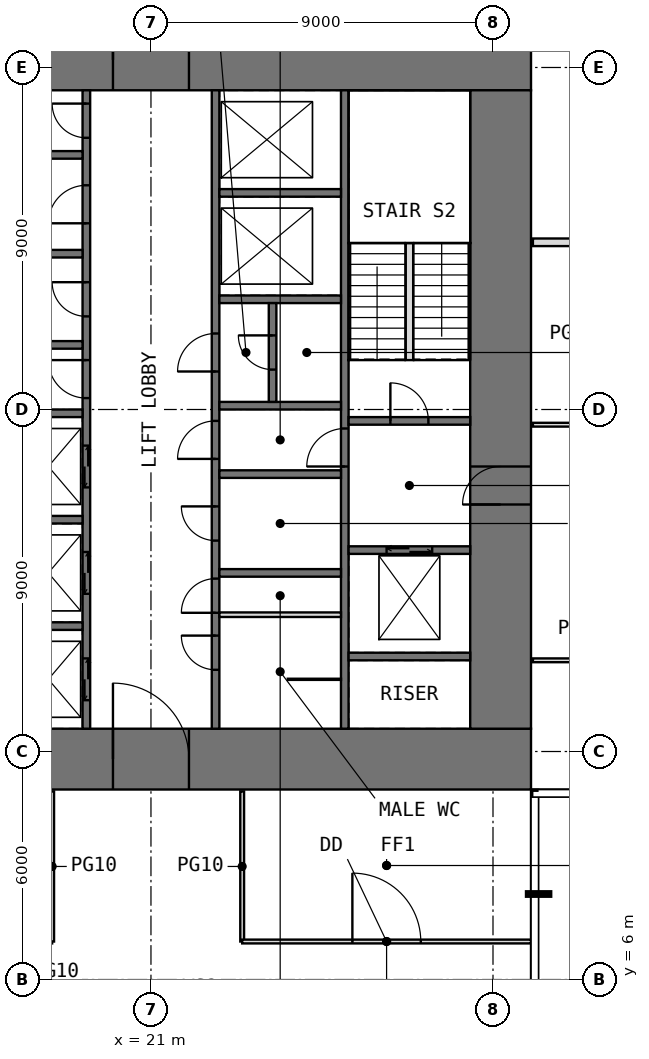
"""IFC4 building model, lengths in metres.
Left out: names, types, materials, properties, quantities, classifications, styles, units other than length and angle.
Written with IfcOpenShell. Run it as: python <this file> out.ifc"""

import sys

from ifc_helpers import new_model, si_unit, direction, frame, frame_2d, origin, place, context, subcontext, project, spatial, rectangle, extrude, element, fill, save


model = new_model("IFC4")
c1 = context("Model", 3, precision=1e-05, world=origin(), true_north=direction((0.0, 1.0)))
c2 = subcontext(c1, "Body", "Model", "MODEL_VIEW")
j1 = project(units=[si_unit("LENGTHUNIT", "METRE"), si_unit("PLANEANGLEUNIT", "RADIAN")], contexts=[c1])
p1 = place(None, origin())
s1 = spatial("IfcSite", under=j1, at=p1, CompositionType="ELEMENT")
p2 = place(p1, origin())
s2 = spatial("IfcBuilding", under=s1, at=p2, CompositionType="ELEMENT")
p3 = place(p2, frame((0.0, 0.0, 108.5)))
s3 = spatial("IfcBuildingStorey", under=s2, at=p3, CompositionType="ELEMENT", Elevation=108.5)
p4 = place(p3, frame((11.0, 11.8, -0.05), z_axis=(0.0, 0.0, 1.0), x_axis=(1.0, 0.0, 0.0)))
e1 = element("IfcWall", 1, at=p4, inside=s3, PredefinedType="SHEAR", context=c2, shape_type="SweptSolid", body=[
    extrude(rectangle(XDim=20.0, YDim=1.6, at=frame_2d((10.0, 0.0))), origin(), (0.0, 0.0, 1.0), 4.0),
])
p5 = place(p4, frame((9.0, 0.0, 0.05)))
e2 = element("IfcOpeningElement", 2, at=p5, cuts=e1, PredefinedType="OPENING", context=c2, shape_type="SweptSolid", body=[
    extrude(rectangle(XDim=2.0, YDim=2.2, at=frame_2d((1.0, 1.1))), frame((0.0, 0.81, 0.0), z_axis=(0.0, -1.0, 0.0), x_axis=(1.0, 0.0, 0.0)), (0.0, 0.0, 1.0), 1.62),
])
p6 = place(p3, frame((11.0, 30.2, -0.05), z_axis=(0.0, 0.0, 1.0), x_axis=(1.0, 0.0, 0.0)))
e3 = element("IfcWall", 3, at=p6, inside=s3, PredefinedType="SHEAR", context=c2, shape_type="SweptSolid", body=[
    extrude(rectangle(XDim=20.0, YDim=1.6, at=frame_2d((10.0, 0.0))), origin(), (0.0, 0.0, 1.0), 4.0),
])
p7 = place(p6, frame((9.0, 0.0, 0.05)))
e4 = element("IfcOpeningElement", 4, at=p7, cuts=e3, PredefinedType="OPENING", context=c2, shape_type="SweptSolid", body=[
    extrude(rectangle(XDim=2.0, YDim=2.2, at=frame_2d((1.0, 1.1))), frame((0.0, 0.81, 0.0), z_axis=(0.0, -1.0, 0.0), x_axis=(1.0, 0.0, 0.0)), (0.0, 0.0, 1.0), 1.62),
])
p8 = place(p3, frame((30.2, 12.6, -0.05), z_axis=(0.0, 0.0, 1.0), x_axis=(0.0, 1.0, 0.0)))
e5 = element("IfcWall", 5, at=p8, inside=s3, PredefinedType="SHEAR", context=c2, shape_type="SweptSolid", body=[
    extrude(rectangle(XDim=16.8, YDim=1.6, at=frame_2d((8.4, 0.0))), origin(), (0.0, 0.0, 1.0), 4.0),
])
p9 = place(p8, frame((5.9, 0.0, 0.05)))
e6 = element("IfcOpeningElement", 6, at=p9, cuts=e5, PredefinedType="OPENING", context=c2, shape_type="SweptSolid", body=[
    extrude(rectangle(XDim=1.0, YDim=2.2, at=frame_2d((0.5, 1.1))), frame((0.0, 0.81, 0.0), z_axis=(0.0, -1.0, 0.0), x_axis=(1.0, 0.0, 0.0)), (0.0, 0.0, 1.0), 1.62),
])
p10 = place(p3, frame((19.3, 12.6, -0.05), z_axis=(0.0, 0.0, 1.0), x_axis=(0.0, 1.0, 0.0)))
e7 = element("IfcWall", 7, at=p10, inside=s3, PredefinedType="SHEAR", context=c2, shape_type="SweptSolid", body=[
    extrude(rectangle(XDim=16.8, YDim=0.2, at=frame_2d((8.4, 0.0))), origin(), (0.0, 0.0, 1.0), 4.0),
])
p11 = place(p10, frame((8.7, 0.0, 0.05)))
e8 = element("IfcOpeningElement", 8, at=p11, cuts=e7, PredefinedType="OPENING", context=c2, shape_type="SweptSolid", body=[
    extrude(rectangle(XDim=1.0, YDim=2.2, at=frame_2d((0.5, 1.1))), frame((0.0, 0.11, 0.0), z_axis=(0.0, -1.0, 0.0), x_axis=(1.0, 0.0, 0.0)), (0.0, 0.0, 1.0), 0.22),
])
p12 = place(p10, frame((10.85, 0.0, 0.05)))
e9 = element("IfcOpeningElement", 9, at=p12, cuts=e7, PredefinedType="OPENING", context=c2, shape_type="SweptSolid", body=[
    extrude(rectangle(XDim=0.9, YDim=2.2, at=frame_2d((0.45, 1.1))), frame((0.0, 0.11, 0.0), z_axis=(0.0, -1.0, 0.0), x_axis=(1.0, 0.0, 0.0)), (0.0, 0.0, 1.0), 0.22),
])
p13 = place(p10, frame((13.3, 0.0, 0.05)))
e10 = element("IfcOpeningElement", 10, at=p13, cuts=e7, PredefinedType="OPENING", context=c2, shape_type="SweptSolid", body=[
    extrude(rectangle(XDim=1.0, YDim=2.2, at=frame_2d((0.5, 1.1))), frame((0.0, 0.11, 0.0), z_axis=(0.0, -1.0, 0.0), x_axis=(1.0, 0.0, 0.0)), (0.0, 0.0, 1.0), 0.22),
])
p14 = place(p10, frame((15.55, 0.0, 0.05)))
e11 = element("IfcOpeningElement", 11, at=p14, cuts=e7, PredefinedType="OPENING", context=c2, shape_type="SweptSolid", body=[
    extrude(rectangle(XDim=0.9, YDim=2.2, at=frame_2d((0.45, 1.1))), frame((0.0, 0.11, 0.0), z_axis=(0.0, -1.0, 0.0), x_axis=(1.0, 0.0, 0.0)), (0.0, 0.0, 1.0), 0.22),
])
p15 = place(p10, frame((0.75, 0.0, 0.05)))
e12 = element("IfcOpeningElement", 12, at=p15, cuts=e7, PredefinedType="OPENING", context=c2, shape_type="SweptSolid", body=[
    extrude(rectangle(XDim=1.1, YDim=2.2, at=frame_2d((0.55, 1.1))), frame((0.0, 0.11, 0.0), z_axis=(0.0, -1.0, 0.0), x_axis=(1.0, 0.0, 0.0)), (0.0, 0.0, 1.0), 0.22),
])
p16 = place(p10, frame((3.55, 0.0, 0.05)))
e13 = element("IfcOpeningElement", 13, at=p16, cuts=e7, PredefinedType="OPENING", context=c2, shape_type="SweptSolid", body=[
    extrude(rectangle(XDim=1.1, YDim=2.2, at=frame_2d((0.55, 1.1))), frame((0.0, 0.11, 0.0), z_axis=(0.0, -1.0, 0.0), x_axis=(1.0, 0.0, 0.0)), (0.0, 0.0, 1.0), 0.22),
])
p17 = place(p10, frame((6.35, 0.0, 0.05)))
e14 = element("IfcOpeningElement", 14, at=p17, cuts=e7, PredefinedType="OPENING", context=c2, shape_type="SweptSolid", body=[
    extrude(rectangle(XDim=1.1, YDim=2.2, at=frame_2d((0.55, 1.1))), frame((0.0, 0.11, 0.0), z_axis=(0.0, -1.0, 0.0), x_axis=(1.0, 0.0, 0.0)), (0.0, 0.0, 1.0), 0.22),
])
p18 = place(p3, frame((22.7, 12.6, -0.05), z_axis=(0.0, 0.0, 1.0), x_axis=(0.0, 1.0, 0.0)))
e15 = element("IfcWall", 15, at=p18, inside=s3, PredefinedType="SHEAR", context=c2, shape_type="SweptSolid", body=[
    extrude(rectangle(XDim=16.8, YDim=0.2, at=frame_2d((8.4, 0.0))), origin(), (0.0, 0.0, 1.0), 4.0),
])
p19 = place(p18, frame((3.05, 0.0, 0.05)))
e16 = element("IfcOpeningElement", 16, at=p19, cuts=e15, PredefinedType="OPENING", context=c2, shape_type="SweptSolid", body=[
    extrude(rectangle(XDim=0.9, YDim=2.2, at=frame_2d((0.45, 1.1))), frame((0.0, 0.11, 0.0), z_axis=(0.0, -1.0, 0.0), x_axis=(1.0, 0.0, 0.0)), (0.0, 0.0, 1.0), 0.22),
])
p20 = place(p18, frame((7.1, 0.0, 0.05)))
e17 = element("IfcOpeningElement", 17, at=p20, cuts=e15, PredefinedType="OPENING", context=c2, shape_type="SweptSolid", body=[
    extrude(rectangle(XDim=1.0, YDim=2.2, at=frame_2d((0.5, 1.1))), frame((0.0, 0.11, 0.0), z_axis=(0.0, -1.0, 0.0), x_axis=(1.0, 0.0, 0.0)), (0.0, 0.0, 1.0), 0.22),
])
p21 = place(p18, frame((1.55, 0.0, 0.05)))
e18 = element("IfcOpeningElement", 18, at=p21, cuts=e15, PredefinedType="OPENING", context=c2, shape_type="SweptSolid", body=[
    extrude(rectangle(XDim=0.9, YDim=2.2, at=frame_2d((0.45, 1.1))), frame((0.0, 0.11, 0.0), z_axis=(0.0, -1.0, 0.0), x_axis=(1.0, 0.0, 0.0)), (0.0, 0.0, 1.0), 0.22),
])
p22 = place(p18, frame((4.95, 0.0, 0.05)))
e19 = element("IfcOpeningElement", 19, at=p22, cuts=e15, PredefinedType="OPENING", context=c2, shape_type="SweptSolid", body=[
    extrude(rectangle(XDim=0.9, YDim=2.2, at=frame_2d((0.45, 1.1))), frame((0.0, 0.11, 0.0), z_axis=(0.0, -1.0, 0.0), x_axis=(1.0, 0.0, 0.0)), (0.0, 0.0, 1.0), 0.22),
])
p23 = place(p18, frame((9.4, 0.0, 0.05)))
e20 = element("IfcOpeningElement", 20, at=p23, cuts=e15, PredefinedType="OPENING", context=c2, shape_type="SweptSolid", body=[
    extrude(rectangle(XDim=1.0, YDim=2.2, at=frame_2d((0.5, 1.1))), frame((0.0, 0.11, 0.0), z_axis=(0.0, -1.0, 0.0), x_axis=(1.0, 0.0, 0.0)), (0.0, 0.0, 1.0), 0.22),
])
p24 = place(p3, frame((26.1, 12.6, -0.05), z_axis=(0.0, 0.0, 1.0), x_axis=(0.0, 1.0, 0.0)))
e21 = element("IfcWall", 21, at=p24, inside=s3, PredefinedType="SHEAR", context=c2, shape_type="SweptSolid", body=[
    extrude(rectangle(XDim=16.8, YDim=0.2, at=frame_2d((8.4, 0.0))), origin(), (0.0, 0.0, 1.0), 4.0),
])
p25 = place(p24, frame((6.9, 0.0, 0.05)))
e22 = element("IfcOpeningElement", 22, at=p25, cuts=e21, PredefinedType="OPENING", context=c2, shape_type="SweptSolid", body=[
    extrude(rectangle(XDim=1.0, YDim=2.2, at=frame_2d((0.5, 1.1))), frame((0.0, 0.11, 0.0), z_axis=(0.0, -1.0, 0.0), x_axis=(1.0, 0.0, 0.0)), (0.0, 0.0, 1.0), 0.22),
])
for number, where, z_axis, x_axis in (
    (23, (16.0, 15.3, -0.05), (0.0, 0.0, 1.0), (1.0, 0.0, 0.0)),
    (24, (16.0, 18.1, -0.05), (0.0, 0.0, 1.0), (1.0, 0.0, 0.0)),
    (25, (16.0, 20.9, -0.05), (0.0, 0.0, 1.0), (1.0, 0.0, 0.0)),
    (26, (16.0, 22.7, -0.05), (0.0, 0.0, 1.0), (1.0, 0.0, 0.0)),
    (27, (16.0, 25.1, -0.05), (0.0, 0.0, 1.0), (1.0, 0.0, 0.0)),
    (28, (16.0, 27.7, -0.05), (0.0, 0.0, 1.0), (1.0, 0.0, 0.0)),
    (29, (22.8, 16.7, -0.05), (0.0, 0.0, 1.0), (1.0, 0.0, 0.0)),
    (30, (22.8, 19.3, -0.05), (0.0, 0.0, 1.0), (1.0, 0.0, 0.0)),
    (31, (22.8, 21.1, -0.05), (0.0, 0.0, 1.0), (1.0, 0.0, 0.0)),
    (32, (22.8, 23.9, -0.05), (0.0, 0.0, 1.0), (1.0, 0.0, 0.0)),
    (33, (22.8, 26.7, -0.05), (0.0, 0.0, 1.0), (1.0, 0.0, 0.0)),
    (34, (26.2, 14.5, -0.05), (0.0, 0.0, 1.0), (1.0, 0.0, 0.0)),
):
    element("IfcWall", number, at=place(p3, frame(where, z_axis=z_axis, x_axis=x_axis)), inside=s3, PredefinedType="SHEAR", context=c2, shape_type="SweptSolid", body=[
        extrude(rectangle(XDim=3.2, YDim=0.2, at=frame_2d((1.6, 0.0))), origin(), (0.0, 0.0, 1.0), 4.0),
    ])
p26 = place(p3, frame((26.2, 17.3, -0.05), z_axis=(0.0, 0.0, 1.0), x_axis=(1.0, 0.0, 0.0)))
e35 = element("IfcWall", 35, at=p26, inside=s3, PredefinedType="SHEAR", context=c2, shape_type="SweptSolid", body=[
    extrude(rectangle(XDim=3.2, YDim=0.2, at=frame_2d((1.6, 0.0))), origin(), (0.0, 0.0, 1.0), 4.0),
])
p27 = place(p26, frame((1.0, 0.0, 0.05)))
e36 = element("IfcOpeningElement", 36, at=p27, cuts=e35, PredefinedType="OPENING", context=c2, shape_type="SweptSolid", body=[
    extrude(rectangle(XDim=1.2, YDim=2.2, at=frame_2d((0.6, 1.1))), frame((0.0, 0.11, 0.0), z_axis=(0.0, -1.0, 0.0), x_axis=(1.0, 0.0, 0.0)), (0.0, 0.0, 1.0), 0.22),
])
p28 = place(p3, frame((26.2, 20.7, -0.05), z_axis=(0.0, 0.0, 1.0), x_axis=(1.0, 0.0, 0.0)))
e37 = element("IfcWall", 37, at=p28, inside=s3, PredefinedType="SHEAR", context=c2, shape_type="SweptSolid", body=[
    extrude(rectangle(XDim=3.2, YDim=0.2, at=frame_2d((1.6, 0.0))), origin(), (0.0, 0.0, 1.0), 4.0),
])
p29 = place(p28, frame((1.1, 0.0, 0.05)))
e38 = element("IfcOpeningElement", 38, at=p29, cuts=e37, PredefinedType="OPENING", context=c2, shape_type="SweptSolid", body=[
    extrude(rectangle(XDim=1.0, YDim=2.2, at=frame_2d((0.5, 1.1))), frame((0.0, 0.11, 0.0), z_axis=(0.0, -1.0, 0.0), x_axis=(1.0, 0.0, 0.0)), (0.0, 0.0, 1.0), 0.22),
])
p30 = place(p3, frame((22.8, 15.6, 0.0), z_axis=(0.0, 0.0, 1.0), x_axis=(1.0, 0.0, 0.0)))
e39 = element("IfcWall", 39, at=p30, inside=s3, PredefinedType="PARTITIONING", context=c2, shape_type="SweptSolid", body=[
    extrude(rectangle(XDim=3.2, YDim=0.12, at=frame_2d((1.6, 0.0))), origin(), (0.0, 0.0, 1.0), 3.75),
])
p31 = place(p3, frame((24.6, 13.9, 0.0), z_axis=(0.0, 0.0, 1.0), x_axis=(1.0, 0.0, 0.0)))
e40 = element("IfcWall", 40, at=p31, inside=s3, PredefinedType="PARTITIONING", context=c2, shape_type="SweptSolid", body=[
    extrude(rectangle(XDim=1.4, YDim=0.03, at=frame_2d((0.7, 0.0))), origin(), (0.0, 0.0, 1.0), 3.75),
])
p32 = place(p3, frame((24.2, 21.2, -0.05), z_axis=(0.0, 0.0, 1.0), x_axis=(0.0, 1.0, 0.0)))
e41 = element("IfcWall", 41, at=p32, inside=s3, PredefinedType="SHEAR", context=c2, shape_type="SweptSolid", body=[
    extrude(rectangle(XDim=2.6, YDim=0.2, at=frame_2d((1.3, 0.0))), origin(), (0.0, 0.0, 1.0), 4.0),
])
p33 = place(p32, frame((0.85, 0.0, 0.05)))
e42 = element("IfcOpeningElement", 42, at=p33, cuts=e41, PredefinedType="OPENING", context=c2, shape_type="SweptSolid", body=[
    extrude(rectangle(XDim=0.9, YDim=2.2, at=frame_2d((0.45, 1.1))), frame((0.0, 0.11, 0.0), z_axis=(0.0, -1.0, 0.0), x_axis=(1.0, 0.0, 0.0)), (0.0, 0.0, 1.0), 0.22),
])
for number, where, z_axis, x_axis in (
    (43, (18.4, 7.0, 0.0), (0.0, 0.0, 1.0), (0.0, 1.0, 0.0)),
    (44, (23.4, 7.0, 0.0), (0.0, 0.0, 1.0), (0.0, 1.0, 0.0)),
):
    element("IfcWall", number, at=place(p3, frame(where, z_axis=z_axis, x_axis=x_axis)), inside=s3, PredefinedType="PARTITIONING", context=c2, shape_type="SweptSolid", body=[
        extrude(rectangle(XDim=3.95, YDim=0.1, at=frame_2d((1.975, 0.0))), origin(), (0.0, 0.0, 1.0), 3.75),
    ])
p34 = place(p3, frame((23.4, 7.0, 0.0), z_axis=(0.0, 0.0, 1.0), x_axis=(1.0, 0.0, 0.0)))
e45 = element("IfcWall", 45, at=p34, inside=s3, PredefinedType="PARTITIONING", context=c2, shape_type="SweptSolid", body=[
    extrude(rectangle(XDim=7.6, YDim=0.1, at=frame_2d((3.8, 0.0))), origin(), (0.0, 0.0, 1.0), 3.75),
])
p35 = place(p34, frame((2.9, 0.0, 0.0)))
e46 = element("IfcOpeningElement", 46, at=p35, cuts=e45, PredefinedType="OPENING", context=c2, shape_type="SweptSolid", body=[
    extrude(rectangle(XDim=1.8, YDim=2.4, at=frame_2d((0.9, 1.2))), frame((0.0, 0.06, 0.0), z_axis=(0.0, -1.0, 0.0), x_axis=(1.0, 0.0, 0.0)), (0.0, 0.0, 1.0), 0.12),
])
for number, where, z_axis, x_axis in (
    (47, (31.05, 14.4, 0.0), (0.0, 0.0, 1.0), (1.0, 0.0, 0.0)),
    (48, (31.05, 20.6, 0.0), (0.0, 0.0, 1.0), (1.0, 0.0, 0.0)),
):
    element("IfcWall", number, at=place(p3, frame(where, z_axis=z_axis, x_axis=x_axis)), inside=s3, PredefinedType="PARTITIONING", context=c2, shape_type="SweptSolid", body=[
        extrude(rectangle(XDim=3.95, YDim=0.1, at=frame_2d((1.975, 0.0))), origin(), (0.0, 0.0, 1.0), 3.75),
    ])
p36 = place(p3, frame((31.05, 25.4, 0.0), z_axis=(0.0, 0.0, 1.0), x_axis=(1.0, 0.0, 0.0)))
e49 = element("IfcWall", 49, at=p36, inside=s3, PredefinedType="PARTITIONING", context=c2, shape_type="SweptSolid", body=[
    extrude(rectangle(XDim=3.95, YDim=0.2, at=frame_2d((1.975, 0.0))), origin(), (0.0, 0.0, 1.0), 3.75),
])
p37 = place(p3, frame((27.8, 22.3, 0.0), z_axis=(0.0, 0.0, 1.0), x_axis=(0.0, 1.0, 0.0)))
e50 = element("IfcWall", 50, at=p37, inside=s3, PredefinedType="PARTITIONING", context=c2, shape_type="SweptSolid", body=[
    extrude(rectangle(XDim=3.08, YDim=0.2, at=frame_2d((1.54, 0.0))), origin(), (0.0, 0.0, 1.0), 4.0),
])
p38 = place(p5, origin())
e51 = element("IfcDoor", 51, at=p38, inside=s3, OperationType="DOUBLE_DOOR_SINGLE_SWING", PredefinedType="DOOR", context=c2, shape_type="SweptSolid", body=[
    extrude(rectangle(XDim=2.0, YDim=2.2, at=frame_2d((1.0, 1.1))), frame((0.0, 0.025, 0.0), z_axis=(0.0, -1.0, 0.0), x_axis=(1.0, 0.0, 0.0)), (0.0, 0.0, 1.0), 0.05),
])
fill(e2, e51)
p39 = place(p7, origin())
e52 = element("IfcDoor", 52, at=p39, inside=s3, OperationType="DOUBLE_DOOR_SINGLE_SWING", PredefinedType="DOOR", context=c2, shape_type="SweptSolid", body=[
    extrude(rectangle(XDim=2.0, YDim=2.2, at=frame_2d((1.0, 1.1))), frame((0.0, 0.025, 0.0), z_axis=(0.0, -1.0, 0.0), x_axis=(1.0, 0.0, 0.0)), (0.0, 0.0, 1.0), 0.05),
])
fill(e4, e52)
p40 = place(p19, origin())
e53 = element("IfcDoor", 53, at=p40, inside=s3, OperationType="SINGLE_SWING_LEFT", PredefinedType="DOOR", context=c2, shape_type="SweptSolid", body=[
    extrude(rectangle(XDim=0.9, YDim=2.2, at=frame_2d((0.45, 1.1))), frame((0.0, 0.025, 0.0), z_axis=(0.0, -1.0, 0.0), x_axis=(1.0, 0.0, 0.0)), (0.0, 0.0, 1.0), 0.05),
])
fill(e16, e53)
p41 = place(p9, origin())
e54 = element("IfcDoor", 54, at=p41, inside=s3, OperationType="SINGLE_SWING_LEFT", PredefinedType="DOOR", context=c2, shape_type="SweptSolid", body=[
    extrude(rectangle(XDim=1.0, YDim=2.2, at=frame_2d((0.5, 1.1))), frame((0.0, 0.025, 0.0), z_axis=(0.0, -1.0, 0.0), x_axis=(1.0, 0.0, 0.0)), (0.0, 0.0, 1.0), 0.05),
])
fill(e6, e54)
p42 = place(p29, origin())
e55 = element("IfcDoor", 55, at=p42, inside=s3, OperationType="SINGLE_SWING_LEFT", PredefinedType="DOOR", context=c2, shape_type="SweptSolid", body=[
    extrude(rectangle(XDim=1.0, YDim=2.2, at=frame_2d((0.5, 1.1))), frame((0.0, 0.025, 0.0), z_axis=(0.0, -1.0, 0.0), x_axis=(1.0, 0.0, 0.0)), (0.0, 0.0, 1.0), 0.05),
])
fill(e38, e55)
p43 = place(p25, origin())
e56 = element("IfcDoor", 56, at=p43, inside=s3, OperationType="SINGLE_SWING_LEFT", PredefinedType="DOOR", context=c2, shape_type="SweptSolid", body=[
    extrude(rectangle(XDim=1.0, YDim=2.2, at=frame_2d((0.5, 1.1))), frame((0.0, 0.025, 0.0), z_axis=(0.0, -1.0, 0.0), x_axis=(1.0, 0.0, 0.0)), (0.0, 0.0, 1.0), 0.05),
])
fill(e22, e56)
p44 = place(p11, origin())
e57 = element("IfcDoor", 57, at=p44, inside=s3, OperationType="SINGLE_SWING_RIGHT", PredefinedType="DOOR", context=c2, shape_type="SweptSolid", body=[
    extrude(rectangle(XDim=1.0, YDim=2.2, at=frame_2d((0.5, 1.1))), frame((0.0, 0.025, 0.0), z_axis=(0.0, -1.0, 0.0), x_axis=(1.0, 0.0, 0.0)), (0.0, 0.0, 1.0), 0.05),
])
fill(e8, e57)
p45 = place(p20, origin())
e58 = element("IfcDoor", 58, at=p45, inside=s3, OperationType="SINGLE_SWING_LEFT", PredefinedType="DOOR", context=c2, shape_type="SweptSolid", body=[
    extrude(rectangle(XDim=1.0, YDim=2.2, at=frame_2d((0.5, 1.1))), frame((0.0, 0.025, 0.0), z_axis=(0.0, -1.0, 0.0), x_axis=(1.0, 0.0, 0.0)), (0.0, 0.0, 1.0), 0.05),
])
fill(e17, e58)
p46 = place(p12, origin())
e59 = element("IfcDoor", 59, at=p46, inside=s3, OperationType="SINGLE_SWING_RIGHT", PredefinedType="DOOR", context=c2, shape_type="SweptSolid", body=[
    extrude(rectangle(XDim=0.9, YDim=2.2, at=frame_2d((0.45, 1.1))), frame((0.0, 0.025, 0.0), z_axis=(0.0, -1.0, 0.0), x_axis=(1.0, 0.0, 0.0)), (0.0, 0.0, 1.0), 0.05),
])
fill(e9, e59)
p47 = place(p13, origin())
e60 = element("IfcDoor", 60, at=p47, inside=s3, OperationType="SINGLE_SWING_LEFT", PredefinedType="DOOR", context=c2, shape_type="SweptSolid", body=[
    extrude(rectangle(XDim=1.0, YDim=2.2, at=frame_2d((0.5, 1.1))), frame((0.0, 0.025, 0.0), z_axis=(0.0, -1.0, 0.0), x_axis=(1.0, 0.0, 0.0)), (0.0, 0.0, 1.0), 0.05),
])
fill(e10, e60)
p48 = place(p14, origin())
e61 = element("IfcDoor", 61, at=p48, inside=s3, OperationType="SINGLE_SWING_RIGHT", PredefinedType="DOOR", context=c2, shape_type="SweptSolid", body=[
    extrude(rectangle(XDim=0.9, YDim=2.2, at=frame_2d((0.45, 1.1))), frame((0.0, 0.025, 0.0), z_axis=(0.0, -1.0, 0.0), x_axis=(1.0, 0.0, 0.0)), (0.0, 0.0, 1.0), 0.05),
])
fill(e11, e61)
p49 = place(p21, origin())
e62 = element("IfcDoor", 62, at=p49, inside=s3, OperationType="SINGLE_SWING_RIGHT", PredefinedType="DOOR", context=c2, shape_type="SweptSolid", body=[
    extrude(rectangle(XDim=0.9, YDim=2.2, at=frame_2d((0.45, 1.1))), frame((0.0, 0.025, 0.0), z_axis=(0.0, -1.0, 0.0), x_axis=(1.0, 0.0, 0.0)), (0.0, 0.0, 1.0), 0.05),
])
fill(e18, e62)
p50 = place(p22, origin())
e63 = element("IfcDoor", 63, at=p50, inside=s3, OperationType="SINGLE_SWING_RIGHT", PredefinedType="DOOR", context=c2, shape_type="SweptSolid", body=[
    extrude(rectangle(XDim=0.9, YDim=2.2, at=frame_2d((0.45, 1.1))), frame((0.0, 0.025, 0.0), z_axis=(0.0, -1.0, 0.0), x_axis=(1.0, 0.0, 0.0)), (0.0, 0.0, 1.0), 0.05),
])
fill(e19, e63)
p51 = place(p23, origin())
e64 = element("IfcDoor", 64, at=p51, inside=s3, OperationType="SINGLE_SWING_LEFT", PredefinedType="DOOR", context=c2, shape_type="SweptSolid", body=[
    extrude(rectangle(XDim=1.0, YDim=2.2, at=frame_2d((0.5, 1.1))), frame((0.0, 0.025, 0.0), z_axis=(0.0, -1.0, 0.0), x_axis=(1.0, 0.0, 0.0)), (0.0, 0.0, 1.0), 0.05),
])
fill(e20, e64)
p52 = place(p33, origin())
e65 = element("IfcDoor", 65, at=p52, inside=s3, OperationType="SINGLE_SWING_RIGHT", PredefinedType="DOOR", context=c2, shape_type="SweptSolid", body=[
    extrude(rectangle(XDim=0.9, YDim=2.2, at=frame_2d((0.45, 1.1))), frame((0.0, 0.025, 0.0), z_axis=(0.0, -1.0, 0.0), x_axis=(1.0, 0.0, 0.0)), (0.0, 0.0, 1.0), 0.05),
])
fill(e42, e65)
p53 = place(p35, origin())
e66 = element("IfcDoor", 66, at=p53, inside=s3, OperationType="DOUBLE_DOOR_SINGLE_SWING", PredefinedType="DOOR", context=c2, shape_type="SweptSolid", body=[
    extrude(rectangle(XDim=1.8, YDim=2.4, at=frame_2d((0.9, 1.2))), frame((0.0, 0.025, 0.0), z_axis=(0.0, -1.0, 0.0), x_axis=(1.0, 0.0, 0.0)), (0.0, 0.0, 1.0), 0.05),
])
fill(e46, e66)
p54 = place(p15, origin())
e67 = element("IfcDoor", 67, at=p54, inside=s3, OperationType="DOUBLE_DOOR_SLIDING", PredefinedType="DOOR", context=c2, shape_type="SweptSolid", body=[
    extrude(rectangle(XDim=1.1, YDim=2.2, at=frame_2d((0.55, 1.1))), frame((0.0, 0.025, 0.0), z_axis=(0.0, -1.0, 0.0), x_axis=(1.0, 0.0, 0.0)), (0.0, 0.0, 1.0), 0.05),
])
fill(e12, e67)
p55 = place(p16, origin())
e68 = element("IfcDoor", 68, at=p55, inside=s3, OperationType="DOUBLE_DOOR_SLIDING", PredefinedType="DOOR", context=c2, shape_type="SweptSolid", body=[
    extrude(rectangle(XDim=1.1, YDim=2.2, at=frame_2d((0.55, 1.1))), frame((0.0, 0.025, 0.0), z_axis=(0.0, -1.0, 0.0), x_axis=(1.0, 0.0, 0.0)), (0.0, 0.0, 1.0), 0.05),
])
fill(e13, e68)
p56 = place(p17, origin())
e69 = element("IfcDoor", 69, at=p56, inside=s3, OperationType="DOUBLE_DOOR_SLIDING", PredefinedType="DOOR", context=c2, shape_type="SweptSolid", body=[
    extrude(rectangle(XDim=1.1, YDim=2.2, at=frame_2d((0.55, 1.1))), frame((0.0, 0.025, 0.0), z_axis=(0.0, -1.0, 0.0), x_axis=(1.0, 0.0, 0.0)), (0.0, 0.0, 1.0), 0.05),
])
fill(e14, e69)
p57 = place(p27, origin())
e70 = element("IfcDoor", 70, at=p57, inside=s3, OperationType="DOUBLE_DOOR_SLIDING", PredefinedType="DOOR", context=c2, shape_type="SweptSolid", body=[
    extrude(rectangle(XDim=1.2, YDim=2.2, at=frame_2d((0.6, 1.1))), frame((0.0, 0.025, 0.0), z_axis=(0.0, -1.0, 0.0), x_axis=(1.0, 0.0, 0.0)), (0.0, 0.0, 1.0), 0.05),
])
fill(e36, e70)
save(model, sys.argv[1])
